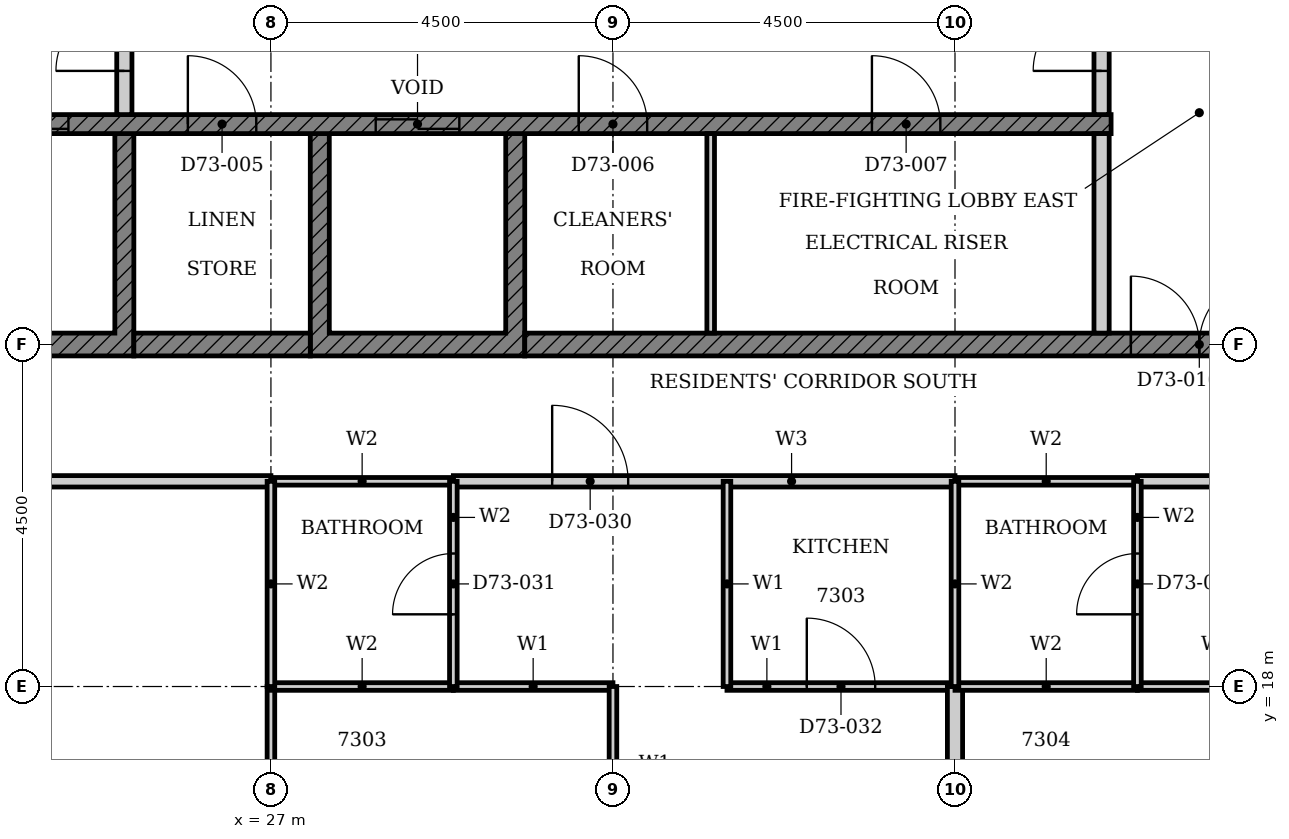
"""IFC4 building model, lengths in metres.
Left out: names, types, materials, properties, quantities, classifications, styles, units other than length and angle.
Written with IfcOpenShell. Run it as: python <this file> out.ifc"""

import sys

from ifc_helpers import new_model, si_unit, direction, frame, frame_2d, origin, place, context, subcontext, project, spatial, polyline, rectangle, outline, extrude, element, fill, save


model = new_model("IFC4")
c1 = context("Model", 3, precision=1e-05, world=origin(), true_north=direction((0.0, 1.0)))
c2 = subcontext(c1, "Body", "Model", "MODEL_VIEW")
j1 = project(units=[si_unit("LENGTHUNIT", "METRE"), si_unit("PLANEANGLEUNIT", "RADIAN")], contexts=[c1])
p1 = place(None, origin())
s1 = spatial("IfcSite", under=j1, at=p1, CompositionType="ELEMENT")
p2 = place(p1, origin())
s2 = spatial("IfcBuilding", under=s1, at=p2, CompositionType="ELEMENT")
p3 = place(p2, frame((0.0, 0.0, 287.1)))
s3 = spatial("IfcBuildingStorey", under=s2, at=p3, CompositionType="ELEMENT", Elevation=287.1)
p4 = place(p3, origin())
e1 = element("IfcWall", 1, at=p4, inside=s3, PredefinedType="SHEAR", context=c2, shape_type="SweptSolid", body=[
    extrude(outline(polyline([(22.375, 22.35), (25.197, 22.35), (25.197, 25.275), (24.947, 25.275), (24.947, 22.65), (22.625, 22.65), (22.625, 25.275), (22.375, 25.275), (22.375, 22.35)])), origin(), (0.0, 0.0, 1.0), 3.4),
])
p5 = place(p3, origin())
e2 = element("IfcWall", 2, at=p5, inside=s3, PredefinedType="SHEAR", context=c2, shape_type="SweptSolid", body=[
    extrude(outline(polyline([(27.518, 22.35), (30.339, 22.35), (30.339, 25.275), (30.089, 25.275), (30.089, 22.65), (27.768, 22.65), (27.768, 25.275), (27.518, 25.275), (27.518, 22.35)])), origin(), (0.0, 0.0, 1.0), 3.4),
])
p6 = place(p3, frame((25.197, 22.5, 0.0), z_axis=(0.0, 0.0, 1.0), x_axis=(1.0, 0.0, 0.0)))
e3 = element("IfcWall", 3, at=p6, inside=s3, PredefinedType="SHEAR", context=c2, shape_type="SweptSolid", body=[
    extrude(rectangle(XDim=2.321, YDim=0.3, at=frame_2d((1.161, 0.0))), origin(), (0.0, 0.0, 1.0), 3.4),
])
p7 = place(p3, frame((30.339, 22.5, 0.0), z_axis=(0.0, 0.0, 1.0), x_axis=(1.0, 0.0, 0.0)))
e4 = element("IfcWall", 4, at=p7, inside=s3, PredefinedType="SHEAR", context=c2, shape_type="SweptSolid", body=[
    extrude(rectangle(XDim=14.511, YDim=0.3, at=frame_2d((7.255, 0.0))), origin(), (0.0, 0.0, 1.0), 3.4),
])
p8 = place(p7, frame((7.975, 0.0, 0.0)))
e5 = element("IfcOpeningElement", 5, at=p8, cuts=e4, PredefinedType="OPENING", context=c2, shape_type="SweptSolid", body=[
    extrude(rectangle(XDim=1.8, YDim=2.1, at=frame_2d((0.9, 1.05))), frame((0.0, 0.16, 0.0), z_axis=(0.0, -1.0, 0.0), x_axis=(1.0, 0.0, 0.0)), (0.0, 0.0, 1.0), 0.32),
])
p9 = place(p3, frame((22.375, 25.4, 0.0), z_axis=(0.0, 0.0, 1.0), x_axis=(1.0, 0.0, 0.0)))
e6 = element("IfcWall", 6, at=p9, inside=s3, PredefinedType="SHEAR", context=c2, shape_type="SweptSolid", body=[
    extrude(rectangle(XDim=15.678, YDim=0.25, at=frame_2d((7.839, 0.0))), origin(), (0.0, 0.0, 1.0), 3.4),
])
p10 = place(p9, frame((6.004, 0.0, 0.0)))
e7 = element("IfcOpeningElement", 7, at=p10, cuts=e6, PredefinedType="OPENING", context=c2, shape_type="SweptSolid", body=[
    extrude(rectangle(XDim=1.1, YDim=2.1, at=frame_2d((0.55, 1.05))), frame((0.0, 0.135, 0.0), z_axis=(0.0, -1.0, 0.0), x_axis=(1.0, 0.0, 0.0)), (0.0, 0.0, 1.0), 0.27),
])
p11 = place(p9, frame((0.861, 0.0, 0.0)))
e8 = element("IfcOpeningElement", 8, at=p11, cuts=e6, PredefinedType="OPENING", context=c2, shape_type="SweptSolid", body=[
    extrude(rectangle(XDim=1.1, YDim=2.1, at=frame_2d((0.55, 1.05))), frame((0.0, 0.135, 0.0), z_axis=(0.0, -1.0, 0.0), x_axis=(1.0, 0.0, 0.0)), (0.0, 0.0, 1.0), 0.27),
])
p12 = place(p9, frame((3.532, 0.0, 0.0)))
e9 = element("IfcOpeningElement", 9, at=p12, cuts=e6, PredefinedType="OPENING", context=c2, shape_type="SweptSolid", body=[
    extrude(rectangle(XDim=0.9, YDim=2.1, at=frame_2d((0.45, 1.05))), frame((0.0, 0.135, 0.0), z_axis=(0.0, -1.0, 0.0), x_axis=(1.0, 0.0, 0.0)), (0.0, 0.0, 1.0), 0.27),
])
p13 = place(p9, frame((8.675, 0.0, 0.0)))
e10 = element("IfcOpeningElement", 10, at=p13, cuts=e6, PredefinedType="OPENING", context=c2, shape_type="SweptSolid", body=[
    extrude(rectangle(XDim=0.9, YDim=2.1, at=frame_2d((0.45, 1.05))), frame((0.0, 0.135, 0.0), z_axis=(0.0, -1.0, 0.0), x_axis=(1.0, 0.0, 0.0)), (0.0, 0.0, 1.0), 0.27),
])
p14 = place(p9, frame((12.532, 0.0, 0.0)))
e11 = element("IfcOpeningElement", 11, at=p14, cuts=e6, PredefinedType="OPENING", context=c2, shape_type="SweptSolid", body=[
    extrude(rectangle(XDim=0.9, YDim=2.1, at=frame_2d((0.45, 1.05))), frame((0.0, 0.135, 0.0), z_axis=(0.0, -1.0, 0.0), x_axis=(1.0, 0.0, 0.0)), (0.0, 0.0, 1.0), 0.27),
])
p15 = place(p3, frame((37.928, 22.65, 0.0), z_axis=(0.0, 0.0, 1.0), x_axis=(0.0, 1.0, 0.0)))
e12 = element("IfcWall", 12, at=p15, inside=s3, PredefinedType="PARTITIONING", context=c2, shape_type="SweptSolid", body=[
    extrude(rectangle(XDim=2.625, YDim=0.2, at=frame_2d((1.312, 0.0))), origin(), (0.0, 0.0, 1.0), 3.4),
])
p16 = place(p3, frame((32.786, 22.65, 0.0), z_axis=(0.0, 0.0, 1.0), x_axis=(0.0, 1.0, 0.0)))
e13 = element("IfcWall", 13, at=p16, inside=s3, PredefinedType="PARTITIONING", context=c2, shape_type="SweptSolid", body=[
    extrude(rectangle(XDim=2.625, YDim=0.1, at=frame_2d((1.312, 0.0))), origin(), (0.0, 0.0, 1.0), 3.4),
])
p17 = place(p3, frame((25.072, 25.525, 0.0), z_axis=(0.0, 0.0, 1.0), x_axis=(0.0, 1.0, 0.0)))
e14 = element("IfcWall", 14, at=p17, inside=s3, PredefinedType="PARTITIONING", context=c2, shape_type="SweptSolid", body=[
    extrude(rectangle(XDim=2.95, YDim=0.2, at=frame_2d((1.475, 0.0))), origin(), (0.0, 0.0, 1.0), 3.4),
])
p18 = place(p17, frame((0.575, 0.0, 0.0)))
e15 = element("IfcOpeningElement", 15, at=p18, cuts=e14, PredefinedType="OPENING", context=c2, shape_type="SweptSolid", body=[
    extrude(rectangle(XDim=1.8, YDim=2.1, at=frame_2d((0.9, 1.05))), frame((0.0, 0.11, 0.0), z_axis=(0.0, -1.0, 0.0), x_axis=(1.0, 0.0, 0.0)), (0.0, 0.0, 1.0), 0.22),
])
p19 = place(p3, frame((37.928, 25.525, 0.0), z_axis=(0.0, 0.0, 1.0), x_axis=(0.0, 1.0, 0.0)))
e16 = element("IfcWall", 16, at=p19, inside=s3, PredefinedType="PARTITIONING", context=c2, shape_type="SweptSolid", body=[
    extrude(rectangle(XDim=2.95, YDim=0.2, at=frame_2d((1.475, 0.0))), origin(), (0.0, 0.0, 1.0), 3.4),
])
p20 = place(p19, frame((0.575, 0.0, 0.0)))
e17 = element("IfcOpeningElement", 17, at=p20, cuts=e16, PredefinedType="OPENING", context=c2, shape_type="SweptSolid", body=[
    extrude(rectangle(XDim=1.8, YDim=2.1, at=frame_2d((0.9, 1.05))), frame((0.0, 0.11, 0.0), z_axis=(0.0, -1.0, 0.0), x_axis=(1.0, 0.0, 0.0)), (0.0, 0.0, 1.0), 0.22),
])
p21 = place(p3, frame((18.0, 20.7, 0.0), z_axis=(0.0, 0.0, 1.0), x_axis=(1.0, 0.0, 0.0)))
e18 = element("IfcWall", 18, at=p21, inside=s3, PredefinedType="PARTITIONING", context=c2, shape_type="SweptSolid", body=[
    extrude(rectangle(XDim=9.0, YDim=0.15, at=frame_2d((4.5, 0.0))), origin(), (0.0, 0.0, 1.0), 3.4),
])
p22 = place(p21, frame((4.0, 0.0, 0.0)))
e19 = element("IfcOpeningElement", 19, at=p22, cuts=e18, PredefinedType="OPENING", context=c2, shape_type="SweptSolid", body=[
    extrude(rectangle(XDim=1.0, YDim=2.1, at=frame_2d((0.5, 1.05))), frame((0.0, 0.085, 0.0), z_axis=(0.0, -1.0, 0.0), x_axis=(1.0, 0.0, 0.0)), (0.0, 0.0, 1.0), 0.17),
])
p23 = place(p3, frame((29.4, 20.7, 0.0), z_axis=(0.0, 0.0, 1.0), x_axis=(1.0, 0.0, 0.0)))
e20 = element("IfcWall", 20, at=p23, inside=s3, PredefinedType="PARTITIONING", context=c2, shape_type="SweptSolid", body=[
    extrude(rectangle(XDim=6.6, YDim=0.15, at=frame_2d((3.3, 0.0))), origin(), (0.0, 0.0, 1.0), 3.4),
])
p24 = place(p23, frame((1.3, 0.0, 0.0)))
e21 = element("IfcOpeningElement", 21, at=p24, cuts=e20, PredefinedType="OPENING", context=c2, shape_type="SweptSolid", body=[
    extrude(rectangle(XDim=1.0, YDim=2.2, at=frame_2d((0.5, 1.1))), frame((0.0, 0.085, 0.0), z_axis=(0.0, -1.0, 0.0), x_axis=(1.0, 0.0, 0.0)), (0.0, 0.0, 1.0), 0.17),
])
p25 = place(p3, frame((38.4, 20.7, 0.0), z_axis=(0.0, 0.0, 1.0), x_axis=(1.0, 0.0, 0.0)))
e22 = element("IfcWall", 22, at=p25, inside=s3, PredefinedType="PARTITIONING", context=c2, shape_type="SweptSolid", body=[
    extrude(rectangle(XDim=11.15, YDim=0.15, at=frame_2d((5.575, 0.0))), origin(), (0.0, 0.0, 1.0), 3.4),
])
p26 = place(p25, frame((1.3, 0.0, 0.0)))
e23 = element("IfcOpeningElement", 23, at=p26, cuts=e22, PredefinedType="OPENING", context=c2, shape_type="SweptSolid", body=[
    extrude(rectangle(XDim=1.0, YDim=2.2, at=frame_2d((0.5, 1.1))), frame((0.0, 0.085, 0.0), z_axis=(0.0, -1.0, 0.0), x_axis=(1.0, 0.0, 0.0)), (0.0, 0.0, 1.0), 0.17),
])
p27 = place(p3, frame((29.4, 18.0, 0.0), z_axis=(0.0, 0.0, 1.0), x_axis=(1.0, 0.0, 0.0)))
e24 = element("IfcWall", 24, at=p27, inside=s3, PredefinedType="PARTITIONING", context=c2, shape_type="SweptSolid", body=[
    extrude(rectangle(XDim=2.1, YDim=0.1, at=frame_2d((1.05, 0.0))), origin(), (0.0, 0.0, 1.0), 3.4),
])
p28 = place(p3, frame((33.0, 18.0, 0.0), z_axis=(0.0, 0.0, 1.0), x_axis=(1.0, 0.0, 0.0)))
e25 = element("IfcWall", 25, at=p28, inside=s3, PredefinedType="PARTITIONING", context=c2, shape_type="SweptSolid", body=[
    extrude(rectangle(XDim=3.0, YDim=0.1, at=frame_2d((1.5, 0.0))), origin(), (0.0, 0.0, 1.0), 3.4),
])
p29 = place(p28, frame((1.05, 0.0, 0.0)))
e26 = element("IfcOpeningElement", 26, at=p29, cuts=e25, PredefinedType="OPENING", context=c2, shape_type="SweptSolid", body=[
    extrude(rectangle(XDim=0.9, YDim=2.1, at=frame_2d((0.45, 1.05))), frame((0.0, 0.06, 0.0), z_axis=(0.0, -1.0, 0.0), x_axis=(1.0, 0.0, 0.0)), (0.0, 0.0, 1.0), 0.12),
])
p30 = place(p3, frame((38.4, 18.0, 0.0), z_axis=(0.0, 0.0, 1.0), x_axis=(1.0, 0.0, 0.0)))
e27 = element("IfcWall", 27, at=p30, inside=s3, PredefinedType="PARTITIONING", context=c2, shape_type="SweptSolid", body=[
    extrude(rectangle(XDim=2.1, YDim=0.1, at=frame_2d((1.05, 0.0))), origin(), (0.0, 0.0, 1.0), 3.4),
])
p31 = place(p3, frame((27.0, 13.31, 0.0), z_axis=(0.0, 0.0, 1.0), x_axis=(0.0, 1.0, 0.0)))
e28 = element("IfcWall", 28, at=p31, inside=s3, PredefinedType="PARTITIONING", context=c2, shape_type="SweptSolid", body=[
    extrude(rectangle(XDim=4.69, YDim=0.1, at=frame_2d((2.345, 0.0))), origin(), (0.0, 0.0, 1.0), 3.4),
])
p32 = place(p3, frame((31.5, 13.26, 0.0), z_axis=(0.0, 0.0, 1.0), x_axis=(0.0, 1.0, 0.0)))
e29 = element("IfcWall", 29, at=p32, inside=s3, PredefinedType="PARTITIONING", context=c2, shape_type="SweptSolid", body=[
    extrude(rectangle(XDim=4.74, YDim=0.1, at=frame_2d((2.37, 0.0))), origin(), (0.0, 0.0, 1.0), 3.4),
])
p33 = place(p32, frame((1.8, 0.0, 0.0)))
e30 = element("IfcOpeningElement", 30, at=p33, cuts=e29, PredefinedType="OPENING", context=c2, shape_type="SweptSolid", body=[
    extrude(rectangle(XDim=0.9, YDim=2.1, at=frame_2d((0.45, 1.05))), frame((0.0, 0.06, 0.0), z_axis=(0.0, -1.0, 0.0), x_axis=(1.0, 0.0, 0.0)), (0.0, 0.0, 1.0), 0.12),
])
p34 = place(p3, frame((33.0, 18.0, 0.0), z_axis=(0.0, 0.0, 1.0), x_axis=(0.0, 1.0, 0.0)))
e31 = element("IfcWall", 31, at=p34, inside=s3, PredefinedType="PARTITIONING", context=c2, shape_type="SweptSolid", body=[
    extrude(rectangle(XDim=2.7, YDim=0.1, at=frame_2d((1.35, 0.0))), origin(), (0.0, 0.0, 1.0), 3.4),
])
p35 = place(p3, frame((36.0, 13.31, 0.0), z_axis=(0.0, 0.0, 1.0), x_axis=(0.0, 1.0, 0.0)))
e32 = element("IfcWall", 32, at=p35, inside=s3, PredefinedType="PARTITIONING", context=c2, shape_type="SweptSolid", body=[
    extrude(rectangle(XDim=4.69, YDim=0.2, at=frame_2d((2.345, 0.0))), origin(), (0.0, 0.0, 1.0), 3.4),
])
for number, where, z_axis, x_axis in (
    (33, (27.0, 18.0, 0.0), (0.0, 0.0, 1.0), (1.0, 0.0, 0.0)),
    (34, (36.0, 18.0, 0.0), (0.0, 0.0, 1.0), (1.0, 0.0, 0.0)),
    (35, (27.0, 20.7, 0.0), (0.0, 0.0, 1.0), (1.0, 0.0, 0.0)),
    (36, (36.0, 20.7, 0.0), (0.0, 0.0, 1.0), (1.0, 0.0, 0.0)),
):
    element("IfcWall", number, at=place(p3, frame(where, z_axis=z_axis, x_axis=x_axis)), inside=s3, PredefinedType="PARTITIONING", context=c2, shape_type="SweptSolid", body=[
        extrude(rectangle(XDim=2.4, YDim=0.1, at=frame_2d((1.2, 0.0))), origin(), (0.0, 0.0, 1.0), 3.4),
    ])
p36 = place(p3, frame((27.0, 18.0, 0.0), z_axis=(0.0, 0.0, 1.0), x_axis=(0.0, 1.0, 0.0)))
e37 = element("IfcWall", 37, at=p36, inside=s3, PredefinedType="PARTITIONING", context=c2, shape_type="SweptSolid", body=[
    extrude(rectangle(XDim=2.7, YDim=0.1, at=frame_2d((1.35, 0.0))), origin(), (0.0, 0.0, 1.0), 3.4),
])
p37 = place(p3, frame((29.4, 18.0, 0.0), z_axis=(0.0, 0.0, 1.0), x_axis=(0.0, 1.0, 0.0)))
e38 = element("IfcWall", 38, at=p37, inside=s3, PredefinedType="PARTITIONING", context=c2, shape_type="SweptSolid", body=[
    extrude(rectangle(XDim=2.7, YDim=0.1, at=frame_2d((1.35, 0.0))), origin(), (0.0, 0.0, 1.0), 3.4),
])
p38 = place(p37, frame((0.95, 0.0, 0.0)))
e39 = element("IfcOpeningElement", 39, at=p38, cuts=e38, PredefinedType="OPENING", context=c2, shape_type="SweptSolid", body=[
    extrude(rectangle(XDim=0.8, YDim=2.1, at=frame_2d((0.4, 1.05))), frame((0.0, 0.06, 0.0), z_axis=(0.0, -1.0, 0.0), x_axis=(1.0, 0.0, 0.0)), (0.0, 0.0, 1.0), 0.12),
])
p39 = place(p3, frame((36.0, 18.0, 0.0), z_axis=(0.0, 0.0, 1.0), x_axis=(0.0, 1.0, 0.0)))
e40 = element("IfcWall", 40, at=p39, inside=s3, PredefinedType="PARTITIONING", context=c2, shape_type="SweptSolid", body=[
    extrude(rectangle(XDim=2.7, YDim=0.1, at=frame_2d((1.35, 0.0))), origin(), (0.0, 0.0, 1.0), 3.4),
])
p40 = place(p3, frame((38.4, 18.0, 0.0), z_axis=(0.0, 0.0, 1.0), x_axis=(0.0, 1.0, 0.0)))
e41 = element("IfcWall", 41, at=p40, inside=s3, PredefinedType="PARTITIONING", context=c2, shape_type="SweptSolid", body=[
    extrude(rectangle(XDim=2.7, YDim=0.1, at=frame_2d((1.35, 0.0))), origin(), (0.0, 0.0, 1.0), 3.4),
])
p41 = place(p40, frame((0.95, 0.0, 0.0)))
e42 = element("IfcOpeningElement", 42, at=p41, cuts=e41, PredefinedType="OPENING", context=c2, shape_type="SweptSolid", body=[
    extrude(rectangle(XDim=0.8, YDim=2.1, at=frame_2d((0.4, 1.05))), frame((0.0, 0.06, 0.0), z_axis=(0.0, -1.0, 0.0), x_axis=(1.0, 0.0, 0.0)), (0.0, 0.0, 1.0), 0.12),
])
p42 = place(p10, origin())
e43 = element("IfcDoor", 43, at=p42, inside=s3, OperationType="DOUBLE_DOOR_SLIDING", PredefinedType="DOOR", context=c2, shape_type="SweptSolid", body=[
    extrude(rectangle(XDim=1.1, YDim=2.1, at=frame_2d((0.55, 1.05))), frame((0.0, 0.025, 0.0), z_axis=(0.0, -1.0, 0.0), x_axis=(1.0, 0.0, 0.0)), (0.0, 0.0, 1.0), 0.05),
])
fill(e7, e43)
p43 = place(p11, origin())
e44 = element("IfcDoor", 44, at=p43, inside=s3, OperationType="DOUBLE_DOOR_SLIDING", PredefinedType="DOOR", context=c2, shape_type="SweptSolid", body=[
    extrude(rectangle(XDim=1.1, YDim=2.1, at=frame_2d((0.55, 1.05))), frame((0.0, 0.025, 0.0), z_axis=(0.0, -1.0, 0.0), x_axis=(1.0, 0.0, 0.0)), (0.0, 0.0, 1.0), 0.05),
])
fill(e8, e44)
p44 = place(p12, origin())
e45 = element("IfcDoor", 45, at=p44, inside=s3, OperationType="SINGLE_SWING_LEFT", PredefinedType="DOOR", context=c2, shape_type="SweptSolid", body=[
    extrude(rectangle(XDim=0.9, YDim=2.1, at=frame_2d((0.45, 1.05))), frame((0.0, 0.025, 0.0), z_axis=(0.0, -1.0, 0.0), x_axis=(1.0, 0.0, 0.0)), (0.0, 0.0, 1.0), 0.05),
])
fill(e9, e45)
p45 = place(p13, origin())
e46 = element("IfcDoor", 46, at=p45, inside=s3, OperationType="SINGLE_SWING_LEFT", PredefinedType="DOOR", context=c2, shape_type="SweptSolid", body=[
    extrude(rectangle(XDim=0.9, YDim=2.1, at=frame_2d((0.45, 1.05))), frame((0.0, 0.025, 0.0), z_axis=(0.0, -1.0, 0.0), x_axis=(1.0, 0.0, 0.0)), (0.0, 0.0, 1.0), 0.05),
])
fill(e10, e46)
p46 = place(p14, origin())
e47 = element("IfcDoor", 47, at=p46, inside=s3, OperationType="SINGLE_SWING_LEFT", PredefinedType="DOOR", context=c2, shape_type="SweptSolid", body=[
    extrude(rectangle(XDim=0.9, YDim=2.1, at=frame_2d((0.45, 1.05))), frame((0.0, 0.025, 0.0), z_axis=(0.0, -1.0, 0.0), x_axis=(1.0, 0.0, 0.0)), (0.0, 0.0, 1.0), 0.05),
])
fill(e11, e47)
p47 = place(p18, origin())
e48 = element("IfcDoor", 48, at=p47, inside=s3, OperationType="DOUBLE_DOOR_SINGLE_SWING", PredefinedType="DOOR", context=c2, shape_type="SweptSolid", body=[
    extrude(rectangle(XDim=1.8, YDim=2.1, at=frame_2d((0.9, 1.05))), frame((0.0, 0.025, 0.0), z_axis=(0.0, -1.0, 0.0), x_axis=(1.0, 0.0, 0.0)), (0.0, 0.0, 1.0), 0.05),
])
fill(e15, e48)
p48 = place(p20, origin())
e49 = element("IfcDoor", 49, at=p48, inside=s3, OperationType="DOUBLE_DOOR_SINGLE_SWING", PredefinedType="DOOR", context=c2, shape_type="SweptSolid", body=[
    extrude(rectangle(XDim=1.8, YDim=2.1, at=frame_2d((0.9, 1.05))), frame((0.0, 0.025, 0.0), z_axis=(0.0, -1.0, 0.0), x_axis=(1.0, 0.0, 0.0)), (0.0, 0.0, 1.0), 0.05),
])
fill(e17, e49)
p49 = place(p8, origin())
e50 = element("IfcDoor", 50, at=p49, inside=s3, OperationType="DOUBLE_DOOR_SINGLE_SWING", PredefinedType="DOOR", context=c2, shape_type="SweptSolid", body=[
    extrude(rectangle(XDim=1.8, YDim=2.1, at=frame_2d((0.9, 1.05))), frame((0.0, 0.025, 0.0), z_axis=(0.0, -1.0, 0.0), x_axis=(1.0, 0.0, 0.0)), (0.0, 0.0, 1.0), 0.05),
])
fill(e5, e50)
p50 = place(p24, origin())
e51 = element("IfcDoor", 51, at=p50, inside=s3, OperationType="SINGLE_SWING_RIGHT", PredefinedType="DOOR", context=c2, shape_type="SweptSolid", body=[
    extrude(rectangle(XDim=1.0, YDim=2.2, at=frame_2d((0.5, 1.1))), frame((0.0, 0.025, 0.0), z_axis=(0.0, -1.0, 0.0), x_axis=(1.0, 0.0, 0.0)), (0.0, 0.0, 1.0), 0.05),
])
fill(e21, e51)
p51 = place(p38, origin())
e52 = element("IfcDoor", 52, at=p51, inside=s3, OperationType="SINGLE_SWING_LEFT", PredefinedType="DOOR", context=c2, shape_type="SweptSolid", body=[
    extrude(rectangle(XDim=0.8, YDim=2.1, at=frame_2d((0.4, 1.05))), frame((0.0, 0.025, 0.0), z_axis=(0.0, -1.0, 0.0), x_axis=(1.0, 0.0, 0.0)), (0.0, 0.0, 1.0), 0.05),
])
fill(e39, e52)
p52 = place(p29, origin())
e53 = element("IfcDoor", 53, at=p52, inside=s3, OperationType="SINGLE_SWING_LEFT", PredefinedType="DOOR", context=c2, shape_type="SweptSolid", body=[
    extrude(rectangle(XDim=0.9, YDim=2.1, at=frame_2d((0.45, 1.05))), frame((0.0, 0.025, 0.0), z_axis=(0.0, -1.0, 0.0), x_axis=(1.0, 0.0, 0.0)), (0.0, 0.0, 1.0), 0.05),
])
fill(e26, e53)
p53 = place(p41, origin())
e54 = element("IfcDoor", 54, at=p53, inside=s3, OperationType="SINGLE_SWING_RIGHT", PredefinedType="DOOR", context=c2, shape_type="SweptSolid", body=[
    extrude(rectangle(XDim=0.8, YDim=2.1, at=frame_2d((0.4, 1.05))), frame((0.0, 0.025, 0.0), z_axis=(0.0, -1.0, 0.0), x_axis=(1.0, 0.0, 0.0)), (0.0, 0.0, 1.0), 0.05),
])
fill(e42, e54)
save(model, sys.argv[1])
